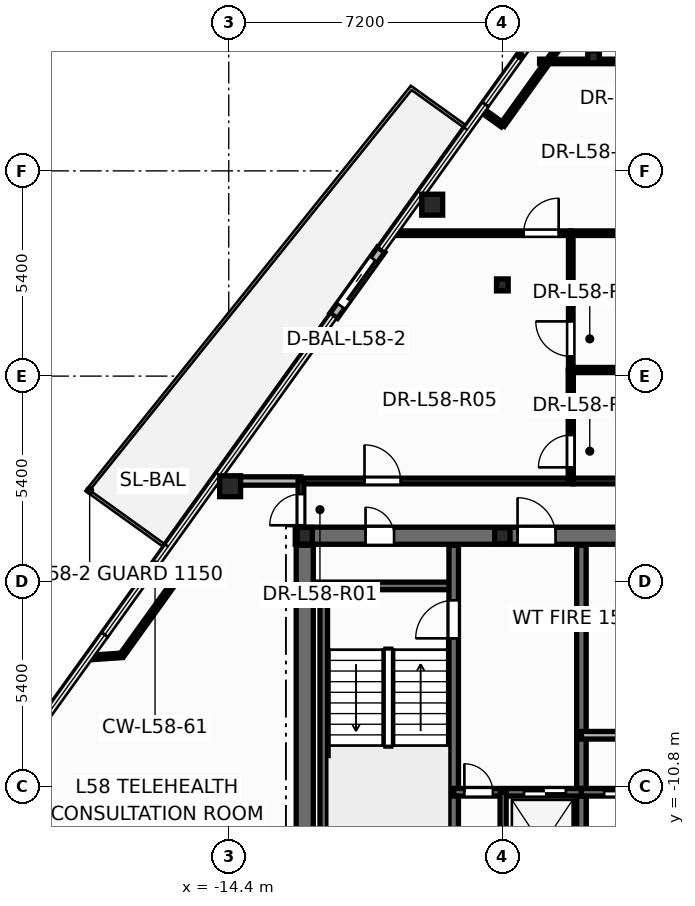
"""IFC4 building model, lengths in metres.
Left out: names, types, materials, properties, quantities, classifications, styles, units other than length and angle.
Written with IfcOpenShell. Run it as: python <this file> out.ifc"""

import sys

from ifc_helpers import new_model, si_unit, direction, frame, frame_2d, origin, origin_2d, place, context, subcontext, project, spatial, rectangle, hollow_circle, i_section, extrude, element, fill, save


model = new_model("IFC4")
c1 = context("Model", 3, precision=1e-05, world=origin(), true_north=direction((0.0, 1.0)))
c2 = subcontext(c1, "Body", "Model", "MODEL_VIEW")
j1 = project(units=[si_unit("LENGTHUNIT", "METRE"), si_unit("PLANEANGLEUNIT", "RADIAN")], contexts=[c1])
p1 = place(None, origin())
s1 = spatial("IfcSite", under=j1, at=p1, CompositionType="ELEMENT")
p2 = place(p1, origin())
s2 = spatial("IfcBuilding", under=s1, at=p2, CompositionType="ELEMENT")
p3 = place(p2, frame((0.0, 0.0, 221.7)))
s3 = spatial("IfcBuildingStorey", under=s2, at=p3, CompositionType="ELEMENT", Elevation=221.7)
for number, where, z_axis, x_axis in (
    (1, (-9.046, 4.51, 0.0), (0.0, 0.0, 1.0), (1.0, 0.0, 0.0)),
    (2, (-14.363, -2.897, 0.0), (0.0, 0.0, 1.0), (1.0, 0.0, 0.0)),
):
    element("IfcColumn", number, at=place(p3, frame(where, z_axis=z_axis, x_axis=x_axis)), inside=s3, PredefinedType="COLUMN", context=c2, shape_type="SweptSolid", body=[
        extrude(hollow_circle(Radius=0.275, WallThickness=0.024, at=origin_2d()), origin(), (0.0, 0.0, 1.0), 3.6),
    ])
p4 = place(p3, frame((-12.4, -4.2, 0.0), z_axis=(0.0, 0.0, 1.0), x_axis=(1.0, 0.0, 0.0)))
e3 = element("IfcColumn", 3, at=p4, inside=s3, PredefinedType="COLUMN", context=c2, shape_type="SweptSolid", body=[
    extrude(i_section(OverallWidth=0.4, OverallDepth=0.44, WebThickness=0.028, FlangeThickness=0.04, at=origin_2d()), origin(), (0.0, 0.0, 1.0), 3.6),
])
p5 = place(p3, frame((-7.2, -4.2, 0.0), z_axis=(0.0, 0.0, 1.0), x_axis=(1.0, 0.0, 0.0)))
e4 = element("IfcColumn", 4, at=p5, inside=s3, PredefinedType="PILASTER", context=c2, shape_type="SweptSolid", body=[
    extrude(i_section(OverallWidth=0.405, OverallDepth=0.414, WebThickness=0.022, FlangeThickness=0.032, at=origin_2d()), origin(), (0.0, 0.0, 1.0), 3.6),
])
for number, where, z_axis, x_axis in (
    (5, (-7.2, 2.4, 0.0), (0.0, 0.0, 1.0), (1.0, 0.0, 0.0)),
    (6, (-4.8, 8.4, 0.0), (0.0, 0.0, 1.0), (1.0, 0.0, 0.0)),
):
    element("IfcColumn", number, at=place(p3, frame(where, z_axis=z_axis, x_axis=x_axis)), inside=s3, PredefinedType="COLUMN", context=c2, shape_type="SweptSolid", body=[
        extrude(i_section(OverallWidth=0.307, OverallDepth=0.314, WebThickness=0.012, FlangeThickness=0.019, at=origin_2d()), origin(), (0.0, 0.0, 1.0), 3.6),
    ])
p6 = place(p3, frame((-10.39, 3.325, -0.015), z_axis=(0.0, 0.0, 1.0), x_axis=(-0.583092889468, -0.812405491274, 0.0)))
e7 = element("IfcWall", 7, at=p6, inside=s3, PredefinedType="STANDARD", context=c2, shape_type="SweptSolid", body=[
    extrude(rectangle(XDim=2.14, YDim=0.24, at=frame_2d((1.07, 0.0))), origin(), (0.0, 0.0, 1.0), 2.878),
])
p7 = place(p6, frame((0.32, 0.0, 0.015)))
e8 = element("IfcOpeningElement", 8, at=p7, cuts=e7, PredefinedType="OPENING", context=c2, shape_type="SweptSolid", body=[
    extrude(rectangle(XDim=1.506, YDim=2.204, at=frame_2d((0.75, 1.102))), frame((0.0, 0.13, 0.0), z_axis=(0.0, -1.0, 0.0), x_axis=(1.0, 0.0, 0.0)), (0.0, 0.0, 1.0), 0.26),
])
p8 = place(p3, frame((-12.65, -4.2, 0.0), z_axis=(0.0, 0.0, 1.0), x_axis=(1.0, 0.0, 0.0)))
e9 = element("IfcWall", 9, at=p8, inside=s3, PredefinedType="SHEAR", context=c2, shape_type="SweptSolid", body=[
    extrude(rectangle(XDim=25.3, YDim=0.45, at=frame_2d((12.65, 0.0))), origin(), (0.0, 0.0, 1.0), 3.6),
])
p9 = place(p8, frame((1.85, 0.0, 0.0)))
e10 = element("IfcOpeningElement", 10, at=p9, cuts=e9, PredefinedType="OPENING", context=c2, shape_type="SweptSolid", body=[
    extrude(rectangle(XDim=0.756, YDim=2.054, at=frame_2d((0.375, 1.027))), frame((0.0, 0.235, 0.0), z_axis=(0.0, -1.0, 0.0), x_axis=(1.0, 0.0, 0.0)), (0.0, 0.0, 1.0), 0.47),
])
p10 = place(p8, frame((21.85, 0.0, 0.0)))
e11 = element("IfcOpeningElement", 11, at=p10, cuts=e9, PredefinedType="OPENING", context=c2, shape_type="SweptSolid", body=[
    extrude(rectangle(XDim=0.756, YDim=2.054, at=frame_2d((0.375, 1.027))), frame((0.0, 0.235, 0.0), z_axis=(0.0, -1.0, 0.0), x_axis=(1.0, 0.0, 0.0)), (0.0, 0.0, 1.0), 0.47),
])
p11 = place(p8, frame((23.5, 0.0, 0.0)))
e12 = element("IfcOpeningElement", 12, at=p11, cuts=e9, PredefinedType="OPENING", context=c2, shape_type="SweptSolid", body=[
    extrude(rectangle(XDim=0.756, YDim=2.054, at=frame_2d((0.375, 1.027))), frame((0.0, 0.235, 0.0), z_axis=(0.0, -1.0, 0.0), x_axis=(1.0, 0.0, 0.0)), (0.0, 0.0, 1.0), 0.47),
])
p12 = place(p8, frame((5.85, 0.0, 0.0)))
e13 = element("IfcOpeningElement", 13, at=p12, cuts=e9, PredefinedType="OPENING", context=c2, shape_type="SweptSolid", body=[
    extrude(rectangle(XDim=1.006, YDim=2.104, at=frame_2d((0.5, 1.052))), frame((0.0, 0.235, 0.0), z_axis=(0.0, -1.0, 0.0), x_axis=(1.0, 0.0, 0.0)), (0.0, 0.0, 1.0), 0.47),
])
p13 = place(p8, frame((10.35, 0.0, 0.0)))
e14 = element("IfcOpeningElement", 14, at=p13, cuts=e9, PredefinedType="OPENING", context=c2, shape_type="SweptSolid", body=[
    extrude(rectangle(XDim=1.406, YDim=2.154, at=frame_2d((0.7, 1.077))), frame((0.0, 0.235, 0.0), z_axis=(0.0, -1.0, 0.0), x_axis=(1.0, 0.0, 0.0)), (0.0, 0.0, 1.0), 0.47),
])
p14 = place(p8, frame((18.45, 0.0, 0.0)))
e15 = element("IfcOpeningElement", 15, at=p14, cuts=e9, PredefinedType="OPENING", context=c2, shape_type="SweptSolid", body=[
    extrude(rectangle(XDim=1.006, YDim=2.104, at=frame_2d((0.5, 1.052))), frame((0.0, 0.235, 0.0), z_axis=(0.0, -1.0, 0.0), x_axis=(1.0, 0.0, 0.0)), (0.0, 0.0, 1.0), 0.47),
])
p15 = place(p3, frame((-12.35, -5.52, 0.0), z_axis=(0.0, 0.0, 1.0), x_axis=(1.0, 0.0, 0.0)))
e16 = element("IfcWall", 16, at=p15, inside=s3, PredefinedType="SOLIDWALL", context=c2, shape_type="SweptSolid", body=[
    extrude(rectangle(XDim=3.87, YDim=0.2, at=frame_2d((1.935, 0.0))), origin(), (0.0, 0.0, 1.0), 3.6),
])
p16 = place(p3, frame((-11.9, -13.1, 0.0), z_axis=(0.0, 0.0, 1.0), x_axis=(0.0, 1.0, 0.0)))
e17 = element("IfcWall", 17, at=p16, inside=s3, PredefinedType="SOLIDWALL", context=c2, shape_type="SweptSolid", body=[
    extrude(rectangle(XDim=7.58, YDim=0.2, at=frame_2d((3.79, 0.0))), origin(), (0.0, 0.0, 1.0), 3.6),
])
p17 = place(p3, frame((-8.48, -13.85, 0.0), z_axis=(0.0, 0.0, 1.0), x_axis=(0.0, 1.0, 0.0)))
e18 = element("IfcWall", 18, at=p17, inside=s3, PredefinedType="SHEAR", context=c2, shape_type="SweptSolid", body=[
    extrude(rectangle(XDim=9.4, YDim=0.25, at=frame_2d((4.7, 0.0))), origin(), (0.0, 0.0, 1.0), 3.6),
])
p18 = place(p17, frame((6.95, 0.0, 0.0)))
e19 = element("IfcOpeningElement", 19, at=p18, cuts=e18, PredefinedType="OPENING", context=c2, shape_type="SweptSolid", body=[
    extrude(rectangle(XDim=1.006, YDim=2.104, at=frame_2d((0.5, 1.052))), frame((0.0, 0.135, 0.0), z_axis=(0.0, -1.0, 0.0), x_axis=(1.0, 0.0, 0.0)), (0.0, 0.0, 1.0), 0.27),
])
p19 = place(p3, frame((-5.12, -13.85, 0.0), z_axis=(0.0, 0.0, 1.0), x_axis=(0.0, 1.0, 0.0)))
e20 = element("IfcWall", 20, at=p19, inside=s3, PredefinedType="SHEAR", context=c2, shape_type="SweptSolid", body=[
    extrude(rectangle(XDim=9.4, YDim=0.25, at=frame_2d((4.7, 0.0))), origin(), (0.0, 0.0, 1.0), 3.6),
])
p20 = place(p3, frame((-8.48, -10.95, 0.0), z_axis=(0.0, 0.0, 1.0), x_axis=(1.0, 0.0, 0.0)))
e21 = element("IfcWall", 21, at=p20, inside=s3, PredefinedType="SOLIDWALL", context=c2, shape_type="SweptSolid", body=[
    extrude(rectangle(XDim=3.36, YDim=0.2, at=frame_2d((1.68, 0.0))), origin(), (0.0, 0.0, 1.0), 3.6),
])
p21 = place(p20, frame((0.28, 0.0, 0.0)))
e22 = element("IfcOpeningElement", 22, at=p21, cuts=e21, PredefinedType="OPENING", context=c2, shape_type="SweptSolid", body=[
    extrude(rectangle(XDim=0.756, YDim=2.054, at=frame_2d((0.375, 1.027))), frame((0.0, 0.11, 0.0), z_axis=(0.0, -1.0, 0.0), x_axis=(1.0, 0.0, 0.0)), (0.0, 0.0, 1.0), 0.22),
])
p22 = place(p20, frame((1.85, 0.0, 0.0)))
e23 = element("IfcOpeningElement", 23, at=p22, cuts=e21, PredefinedType="OPENING", context=c2, shape_type="SweptSolid", body=[
    extrude(rectangle(XDim=1.106, YDim=2.104, at=frame_2d((0.55, 1.052))), frame((0.0, 0.11, 0.0), z_axis=(0.0, -1.0, 0.0), x_axis=(1.0, 0.0, 0.0)), (0.0, 0.0, 1.0), 0.22),
])
p23 = place(p3, frame((-5.12, -10.95, 0.0), z_axis=(0.0, 0.0, 1.0), x_axis=(1.0, 0.0, 0.0)))
e24 = element("IfcWall", 24, at=p23, inside=s3, PredefinedType="SOLIDWALL", context=c2, shape_type="SweptSolid", body=[
    extrude(rectangle(XDim=10.24, YDim=0.2, at=frame_2d((5.12, 0.0))), origin(), (0.0, 0.0, 1.0), 3.6),
])
p24 = place(p23, frame((0.6, 0.0, 0.0)))
e25 = element("IfcOpeningElement", 25, at=p24, cuts=e24, PredefinedType="OPENING", context=c2, shape_type="SweptSolid", body=[
    extrude(rectangle(XDim=1.106, YDim=2.104, at=frame_2d((0.55, 1.052))), frame((0.0, 0.11, 0.0), z_axis=(0.0, -1.0, 0.0), x_axis=(1.0, 0.0, 0.0)), (0.0, 0.0, 1.0), 0.22),
])
p25 = place(p23, frame((2.67, 0.0, 0.0)))
e26 = element("IfcOpeningElement", 26, at=p25, cuts=e24, PredefinedType="OPENING", context=c2, shape_type="SweptSolid", body=[
    extrude(rectangle(XDim=1.106, YDim=2.104, at=frame_2d((0.55, 1.052))), frame((0.0, 0.11, 0.0), z_axis=(0.0, -1.0, 0.0), x_axis=(1.0, 0.0, 0.0)), (0.0, 0.0, 1.0), 0.22),
])
p26 = place(p23, frame((4.57, 0.0, 0.0)))
e27 = element("IfcOpeningElement", 27, at=p26, cuts=e24, PredefinedType="OPENING", context=c2, shape_type="SweptSolid", body=[
    extrude(rectangle(XDim=1.106, YDim=2.104, at=frame_2d((0.55, 1.052))), frame((0.0, 0.11, 0.0), z_axis=(0.0, -1.0, 0.0), x_axis=(1.0, 0.0, 0.0)), (0.0, 0.0, 1.0), 0.22),
])
p27 = place(p23, frame((6.47, 0.0, 0.0)))
e28 = element("IfcOpeningElement", 28, at=p27, cuts=e24, PredefinedType="OPENING", context=c2, shape_type="SweptSolid", body=[
    extrude(rectangle(XDim=1.106, YDim=2.104, at=frame_2d((0.55, 1.052))), frame((0.0, 0.11, 0.0), z_axis=(0.0, -1.0, 0.0), x_axis=(1.0, 0.0, 0.0)), (0.0, 0.0, 1.0), 0.22),
])
p28 = place(p23, frame((8.54, 0.0, 0.0)))
e29 = element("IfcOpeningElement", 29, at=p28, cuts=e24, PredefinedType="OPENING", context=c2, shape_type="SweptSolid", body=[
    extrude(rectangle(XDim=1.106, YDim=2.104, at=frame_2d((0.55, 1.052))), frame((0.0, 0.11, 0.0), z_axis=(0.0, -1.0, 0.0), x_axis=(1.0, 0.0, 0.0)), (0.0, 0.0, 1.0), 0.22),
])
p29 = place(p3, frame((-7.18, -13.85, 0.0), z_axis=(0.0, 0.0, 1.0), x_axis=(0.0, 1.0, 0.0)))
e30 = element("IfcWall", 30, at=p29, inside=s3, PredefinedType="PARTITIONING", context=c2, shape_type="SweptSolid", body=[
    extrude(rectangle(XDim=2.9, YDim=0.16, at=frame_2d((1.45, 0.0))), origin(), (0.0, 0.0, 1.0), 2.47),
])
p30 = place(p3, frame((-12.4, -13.85, 0.0), z_axis=(0.0, 0.0, 1.0), x_axis=(0.0, 1.0, 0.0)))
e31 = element("IfcWall", 31, at=p30, inside=s3, PredefinedType="SHEAR", context=c2, shape_type="SweptSolid", body=[
    extrude(rectangle(XDim=9.4, YDim=0.45, at=frame_2d((4.7, 0.0))), origin(), (0.0, 0.0, 1.0), 3.6),
])
p31 = place(p3, frame((-5.12, -9.45, 0.0), z_axis=(0.0, 0.0, 1.0), x_axis=(1.0, 0.0, 0.0)))
e32 = element("IfcWall", 32, at=p31, inside=s3, PredefinedType="SOLIDWALL", context=c2, shape_type="SweptSolid", body=[
    extrude(rectangle(XDim=2.24, YDim=0.2, at=frame_2d((1.12, 0.0))), origin(), (0.0, 0.0, 1.0), 3.345),
])
p32 = place(p3, frame((-12.5, -2.76, 0.0), z_axis=(0.0, 0.0, 1.0), x_axis=(1.0, 0.0, 0.0)))
e33 = element("IfcWall", 33, at=p32, inside=s3, PredefinedType="PARTITIONING", context=c2, shape_type="SweptSolid", body=[
    extrude(rectangle(XDim=7.16, YDim=0.15, at=frame_2d((3.58, 0.0))), origin(), (0.0, 0.0, 1.0), 2.32),
])
p33 = place(p32, frame((1.672, 0.0, 0.0)))
e34 = element("IfcOpeningElement", 34, at=p33, cuts=e33, PredefinedType="OPENING", context=c2, shape_type="SweptSolid", body=[
    extrude(rectangle(XDim=0.956, YDim=2.104, at=frame_2d((0.475, 1.052))), frame((0.0, 0.085, 0.0), z_axis=(0.0, -1.0, 0.0), x_axis=(1.0, 0.0, 0.0)), (0.0, 0.0, 1.0), 0.17),
])
p34 = place(p3, frame((-10.077, 3.76, 0.0), z_axis=(0.0, 0.0, 1.0), x_axis=(1.0, 0.0, 0.0)))
e35 = element("IfcWall", 35, at=p34, inside=s3, PredefinedType="PARTITIONING", context=c2, shape_type="SweptSolid", body=[
    extrude(rectangle(XDim=4.677, YDim=0.12, at=frame_2d((2.339, 0.0))), origin(), (0.0, 0.0, 1.0), 2.62),
])
p35 = place(p34, frame((3.439, 0.0, 0.0)))
e36 = element("IfcOpeningElement", 36, at=p35, cuts=e35, PredefinedType="OPENING", context=c2, shape_type="SweptSolid", body=[
    extrude(rectangle(XDim=0.926, YDim=2.104, at=frame_2d((0.46, 1.052))), frame((0.0, 0.07, 0.0), z_axis=(0.0, -1.0, 0.0), x_axis=(1.0, 0.0, 0.0)), (0.0, 0.0, 1.0), 0.14),
])
p36 = place(p3, frame((-5.4, 0.16, 0.0), z_axis=(0.0, 0.0, 1.0), x_axis=(0.0, 1.0, 0.0)))
e37 = element("IfcWall", 37, at=p36, inside=s3, PredefinedType="PARTITIONING", context=c2, shape_type="SweptSolid", body=[
    extrude(rectangle(XDim=3.6, YDim=0.12, at=frame_2d((1.8, 0.0))), origin(), (0.0, 0.0, 1.0), 2.32),
])
p37 = place(p36, frame((0.36, 0.0, 0.0)))
e38 = element("IfcOpeningElement", 38, at=p37, cuts=e37, PredefinedType="OPENING", context=c2, shape_type="SweptSolid", body=[
    extrude(rectangle(XDim=0.926, YDim=2.104, at=frame_2d((0.46, 1.052))), frame((0.0, 0.07, 0.0), z_axis=(0.0, -1.0, 0.0), x_axis=(1.0, 0.0, 0.0)), (0.0, 0.0, 1.0), 0.14),
])
p38 = place(p3, frame((-6.22, 8.28, 0.0), z_axis=(0.0, 0.0, 1.0), x_axis=(1.0, 0.0, 0.0)))
e39 = element("IfcWall", 39, at=p38, inside=s3, PredefinedType="PARTITIONING", context=c2, shape_type="SweptSolid", body=[
    extrude(rectangle(XDim=3.42, YDim=0.12, at=frame_2d((1.71, 0.0))), origin(), (0.0, 0.0, 1.0), 2.62),
])
p39 = place(p38, frame((2.105, 0.0, 0.0)))
e40 = element("IfcOpeningElement", 40, at=p39, cuts=e39, PredefinedType="OPENING", context=c2, shape_type="SweptSolid", body=[
    extrude(rectangle(XDim=0.926, YDim=2.104, at=frame_2d((0.46, 1.052))), frame((0.0, 0.07, 0.0), z_axis=(0.0, -1.0, 0.0), x_axis=(1.0, 0.0, 0.0)), (0.0, 0.0, 1.0), 0.14),
])
p40 = place(p3, frame((-5.4, -2.76, 0.0), z_axis=(0.0, 0.0, 1.0), x_axis=(0.0, 1.0, 0.0)))
e41 = element("IfcWall", 41, at=p40, inside=s3, PredefinedType="PARTITIONING", context=c2, shape_type="SweptSolid", body=[
    extrude(rectangle(XDim=2.92, YDim=0.135, at=frame_2d((1.46, 0.0))), origin(), (0.0, 0.0, 1.0), 3.345),
])
p41 = place(p40, frame((0.359, 0.0, 0.0)))
e42 = element("IfcOpeningElement", 42, at=p41, cuts=e41, PredefinedType="OPENING", context=c2, shape_type="SweptSolid", body=[
    extrude(rectangle(XDim=0.856, YDim=2.104, at=frame_2d((0.425, 1.052))), frame((0.0, 0.078, 0.0), z_axis=(0.0, -1.0, 0.0), x_axis=(1.0, 0.0, 0.0)), (0.0, 0.0, 1.0), 0.155),
])
p42 = place(p3, frame((-5.338, -2.76, 0.0), z_axis=(0.0, 0.0, 1.0), x_axis=(1.0, 0.0, 0.0)))
e43 = element("IfcWall", 43, at=p42, inside=s3, PredefinedType="PARTITIONING", context=c2, shape_type="SweptSolid", body=[
    extrude(rectangle(XDim=4.776, YDim=0.15, at=frame_2d((2.388, 0.0))), origin(), (0.0, 0.0, 1.0), 2.964),
])
p43 = place(p3, frame((-5.4, 0.16, 0.0), z_axis=(0.0, 0.0, 1.0), x_axis=(1.0, 0.0, 0.0)))
e44 = element("IfcWall", 44, at=p43, inside=s3, PredefinedType="PARTITIONING", context=c2, shape_type="SweptSolid", body=[
    extrude(rectangle(XDim=4.9, YDim=0.135, at=frame_2d((2.45, 0.0))), origin(), (0.0, 0.0, 1.0), 2.964),
])
p44 = place(p3, frame((-5.4, 3.76, 0.0), z_axis=(0.0, 0.0, 1.0), x_axis=(1.0, 0.0, 0.0)))
e45 = element("IfcWall", 45, at=p44, inside=s3, PredefinedType="PARTITIONING", context=c2, shape_type="SweptSolid", body=[
    extrude(rectangle(XDim=2.6, YDim=0.12, at=frame_2d((1.3, 0.0))), origin(), (0.0, 0.0, 1.0), 3.345),
])
p45 = place(p3, frame((-15.801, -5.38, 0.0), z_axis=(0.0, 0.0, 1.0), x_axis=(-0.583201664134, -0.812327408716, 0.0)))
e46 = element("IfcWall", 46, at=p45, inside=s3, PredefinedType="PARTITIONING", context=c2, shape_type="SweptSolid", body=[
    extrude(rectangle(XDim=2.421, YDim=0.12, at=frame_2d((1.21, 0.0))), origin(), (0.0, 0.0, 1.0), 3.345),
])
p46 = place(p3, frame((-5.785, 8.574, 0.0), z_axis=(0.0, 0.0, 1.0), x_axis=(-0.583135111371, -0.81237518542, 0.0)))
e47 = element("IfcWall", 47, at=p46, inside=s3, PredefinedType="PARTITIONING", context=c2, shape_type="SweptSolid", body=[
    extrude(rectangle(XDim=2.421, YDim=0.12, at=frame_2d((1.21, 0.0))), origin(), (0.0, 0.0, 1.0), 3.345),
])
p47 = place(p3, frame((-14.757, -2.76, 0.0), z_axis=(0.0, 0.0, 1.0), x_axis=(1.0, 0.0, 0.0)))
e48 = element("IfcWall", 48, at=p47, inside=s3, PredefinedType="PARTITIONING", context=c2, shape_type="SweptSolid", body=[
    extrude(rectangle(XDim=2.257, YDim=0.22, at=frame_2d((1.129, 0.0))), origin(), (0.0, 0.0, 1.0), 2.62),
])
p48 = place(p3, frame((-12.5, -4.24, 0.0), z_axis=(0.0, 0.0, 1.0), x_axis=(0.0, 1.0, 0.0)))
e49 = element("IfcWall", 49, at=p48, inside=s3, PredefinedType="PARTITIONING", context=c2, shape_type="SweptSolid", body=[
    extrude(rectangle(XDim=1.48, YDim=0.15, at=frame_2d((0.74, 0.0))), origin(), (0.0, 0.0, 1.0), 2.32),
])
p49 = place(p48, frame((0.315, 0.0, 0.0)))
e50 = element("IfcOpeningElement", 50, at=p49, cuts=e49, PredefinedType="OPENING", context=c2, shape_type="SweptSolid", body=[
    extrude(rectangle(XDim=0.826, YDim=2.104, at=frame_2d((0.41, 1.052))), frame((0.0, 0.085, 0.0), z_axis=(0.0, -1.0, 0.0), x_axis=(1.0, 0.0, 0.0)), (0.0, 0.0, 1.0), 0.17),
])
p50 = place(p3, frame((-17.213, -7.347, 0.0), z_axis=(0.0, 0.0, 1.0), x_axis=(-0.997593647417, -0.069331916407, 0.0)))
e51 = element("IfcWall", 51, at=p50, inside=s3, PredefinedType="PARTITIONING", context=c2, shape_type="SweptSolid", body=[
    extrude(rectangle(XDim=0.87, YDim=0.12, at=frame_2d((0.435, 0.0))), origin(), (0.0, 0.0, 1.0), 2.863),
])
p51 = place(p3, frame((-16.345, -4.99, 0.0), z_axis=(0.0, 0.0, 1.0), x_axis=(0.812328158573, -0.583200619675, 0.0)))
e52 = element("IfcWall", 52, at=p51, inside=s3, PredefinedType="PARTITIONING", context=c2, shape_type="SweptSolid", body=[
    extrude(rectangle(XDim=0.67, YDim=0.12, at=frame_2d((0.335, 0.0))), origin(), (0.0, 0.0, 1.0), 2.863),
])
p52 = place(p3, frame((-7.197, 6.607, 0.0), z_axis=(0.0, 0.0, 1.0), x_axis=(-0.812549510699, 0.582892179277, 0.0)))
e53 = element("IfcWall", 53, at=p52, inside=s3, PredefinedType="PARTITIONING", context=c2, shape_type="SweptSolid", body=[
    extrude(rectangle(XDim=0.67, YDim=0.12, at=frame_2d((0.335, 0.0))), origin(), (0.0, 0.0, 1.0), 2.863),
])
p53 = place(p7, origin())
e54 = element("IfcDoor", 54, at=p53, inside=s3, OperationType="SLIDING_TO_RIGHT", PredefinedType="DOOR", context=c2, shape_type="SweptSolid", body=[
    extrude(rectangle(XDim=1.5, YDim=2.2, at=frame_2d((0.75, 1.1))), frame((0.0, 0.025, 0.0), z_axis=(0.0, -1.0, 0.0), x_axis=(1.0, 0.0, 0.0)), (0.0, 0.0, 1.0), 0.05),
])
fill(e8, e54)
p54 = place(p18, origin())
e55 = element("IfcDoor", 55, at=p54, inside=s3, OperationType="SINGLE_SWING_LEFT", PredefinedType="DOOR", context=c2, shape_type="SweptSolid", body=[
    extrude(rectangle(XDim=1.0, YDim=2.1, at=frame_2d((0.5, 1.05))), frame((0.0, 0.025, 0.0), z_axis=(0.0, -1.0, 0.0), x_axis=(1.0, 0.0, 0.0)), (0.0, 0.0, 1.0), 0.05),
])
fill(e19, e55)
p55 = place(p21, origin())
e56 = element("IfcDoor", 56, at=p55, inside=s3, OperationType="SINGLE_SWING_LEFT", PredefinedType="DOOR", context=c2, shape_type="SweptSolid", body=[
    extrude(rectangle(XDim=0.75, YDim=2.05, at=frame_2d((0.375, 1.025))), frame((0.0, 0.025, 0.0), z_axis=(0.0, -1.0, 0.0), x_axis=(1.0, 0.0, 0.0)), (0.0, 0.0, 1.0), 0.05),
])
fill(e22, e56)
p56 = place(p22, origin())
e57 = element("IfcDoor", 57, at=p56, inside=s3, OperationType="DOUBLE_DOOR_SLIDING", PredefinedType="DOOR", context=c2, shape_type="SweptSolid", body=[
    extrude(rectangle(XDim=1.1, YDim=2.1, at=frame_2d((0.55, 1.05))), frame((0.0, 0.025, 0.0), z_axis=(0.0, -1.0, 0.0), x_axis=(1.0, 0.0, 0.0)), (0.0, 0.0, 1.0), 0.05),
])
fill(e23, e57)
p57 = place(p24, origin())
e58 = element("IfcDoor", 58, at=p57, inside=s3, OperationType="DOUBLE_DOOR_SLIDING", PredefinedType="DOOR", context=c2, shape_type="SweptSolid", body=[
    extrude(rectangle(XDim=1.1, YDim=2.1, at=frame_2d((0.55, 1.05))), frame((0.0, 0.025, 0.0), z_axis=(0.0, -1.0, 0.0), x_axis=(1.0, 0.0, 0.0)), (0.0, 0.0, 1.0), 0.05),
])
fill(e25, e58)
p58 = place(p9, origin())
e59 = element("IfcDoor", 59, at=p58, inside=s3, OperationType="SINGLE_SWING_LEFT", PredefinedType="DOOR", context=c2, shape_type="SweptSolid", body=[
    extrude(rectangle(XDim=0.75, YDim=2.05, at=frame_2d((0.375, 1.025))), frame((0.0, 0.025, 0.0), z_axis=(0.0, -1.0, 0.0), x_axis=(1.0, 0.0, 0.0)), (0.0, 0.0, 1.0), 0.05),
])
fill(e10, e59)
p59 = place(p12, origin())
e60 = element("IfcDoor", 60, at=p59, inside=s3, OperationType="SINGLE_SWING_LEFT", PredefinedType="DOOR", context=c2, shape_type="SweptSolid", body=[
    extrude(rectangle(XDim=1.0, YDim=2.1, at=frame_2d((0.5, 1.05))), frame((0.0, 0.025, 0.0), z_axis=(0.0, -1.0, 0.0), x_axis=(1.0, 0.0, 0.0)), (0.0, 0.0, 1.0), 0.05),
])
fill(e13, e60)
p60 = place(p49, origin())
e61 = element("IfcDoor", 61, at=p60, inside=s3, OperationType="SINGLE_SWING_LEFT", PredefinedType="DOOR", context=c2, shape_type="SweptSolid", body=[
    extrude(rectangle(XDim=0.82, YDim=2.1, at=frame_2d((0.41, 1.05))), frame((0.0, 0.025, 0.0), z_axis=(0.0, -1.0, 0.0), x_axis=(1.0, 0.0, 0.0)), (0.0, 0.0, 1.0), 0.05),
])
fill(e50, e61)
p61 = place(p41, origin())
e62 = element("IfcDoor", 62, at=p61, inside=s3, OperationType="SINGLE_SWING_LEFT", PredefinedType="DOOR", context=c2, shape_type="SweptSolid", body=[
    extrude(rectangle(XDim=0.85, YDim=2.1, at=frame_2d((0.425, 1.05))), frame((0.0, 0.025, 0.0), z_axis=(0.0, -1.0, 0.0), x_axis=(1.0, 0.0, 0.0)), (0.0, 0.0, 1.0), 0.05),
])
fill(e42, e62)
p62 = place(p37, origin())
e63 = element("IfcDoor", 63, at=p62, inside=s3, OperationType="SINGLE_SWING_RIGHT", PredefinedType="DOOR", context=c2, shape_type="SweptSolid", body=[
    extrude(rectangle(XDim=0.92, YDim=2.1, at=frame_2d((0.46, 1.05))), frame((0.0, 0.025, 0.0), z_axis=(0.0, -1.0, 0.0), x_axis=(1.0, 0.0, 0.0)), (0.0, 0.0, 1.0), 0.05),
])
fill(e38, e63)
p63 = place(p33, origin())
e64 = element("IfcDoor", 64, at=p63, inside=s3, OperationType="SINGLE_SWING_LEFT", PredefinedType="DOOR", context=c2, shape_type="SweptSolid", body=[
    extrude(rectangle(XDim=0.95, YDim=2.1, at=frame_2d((0.475, 1.05))), frame((0.0, 0.025, 0.0), z_axis=(0.0, -1.0, 0.0), x_axis=(1.0, 0.0, 0.0)), (0.0, 0.0, 1.0), 0.05),
])
fill(e34, e64)
p64 = place(p35, origin())
e65 = element("IfcDoor", 65, at=p64, inside=s3, OperationType="SINGLE_SWING_RIGHT", PredefinedType="DOOR", context=c2, shape_type="SweptSolid", body=[
    extrude(rectangle(XDim=0.92, YDim=2.1, at=frame_2d((0.46, 1.05))), frame((0.0, 0.025, 0.0), z_axis=(0.0, -1.0, 0.0), x_axis=(1.0, 0.0, 0.0)), (0.0, 0.0, 1.0), 0.05),
])
fill(e36, e65)
save(model, sys.argv[1])
